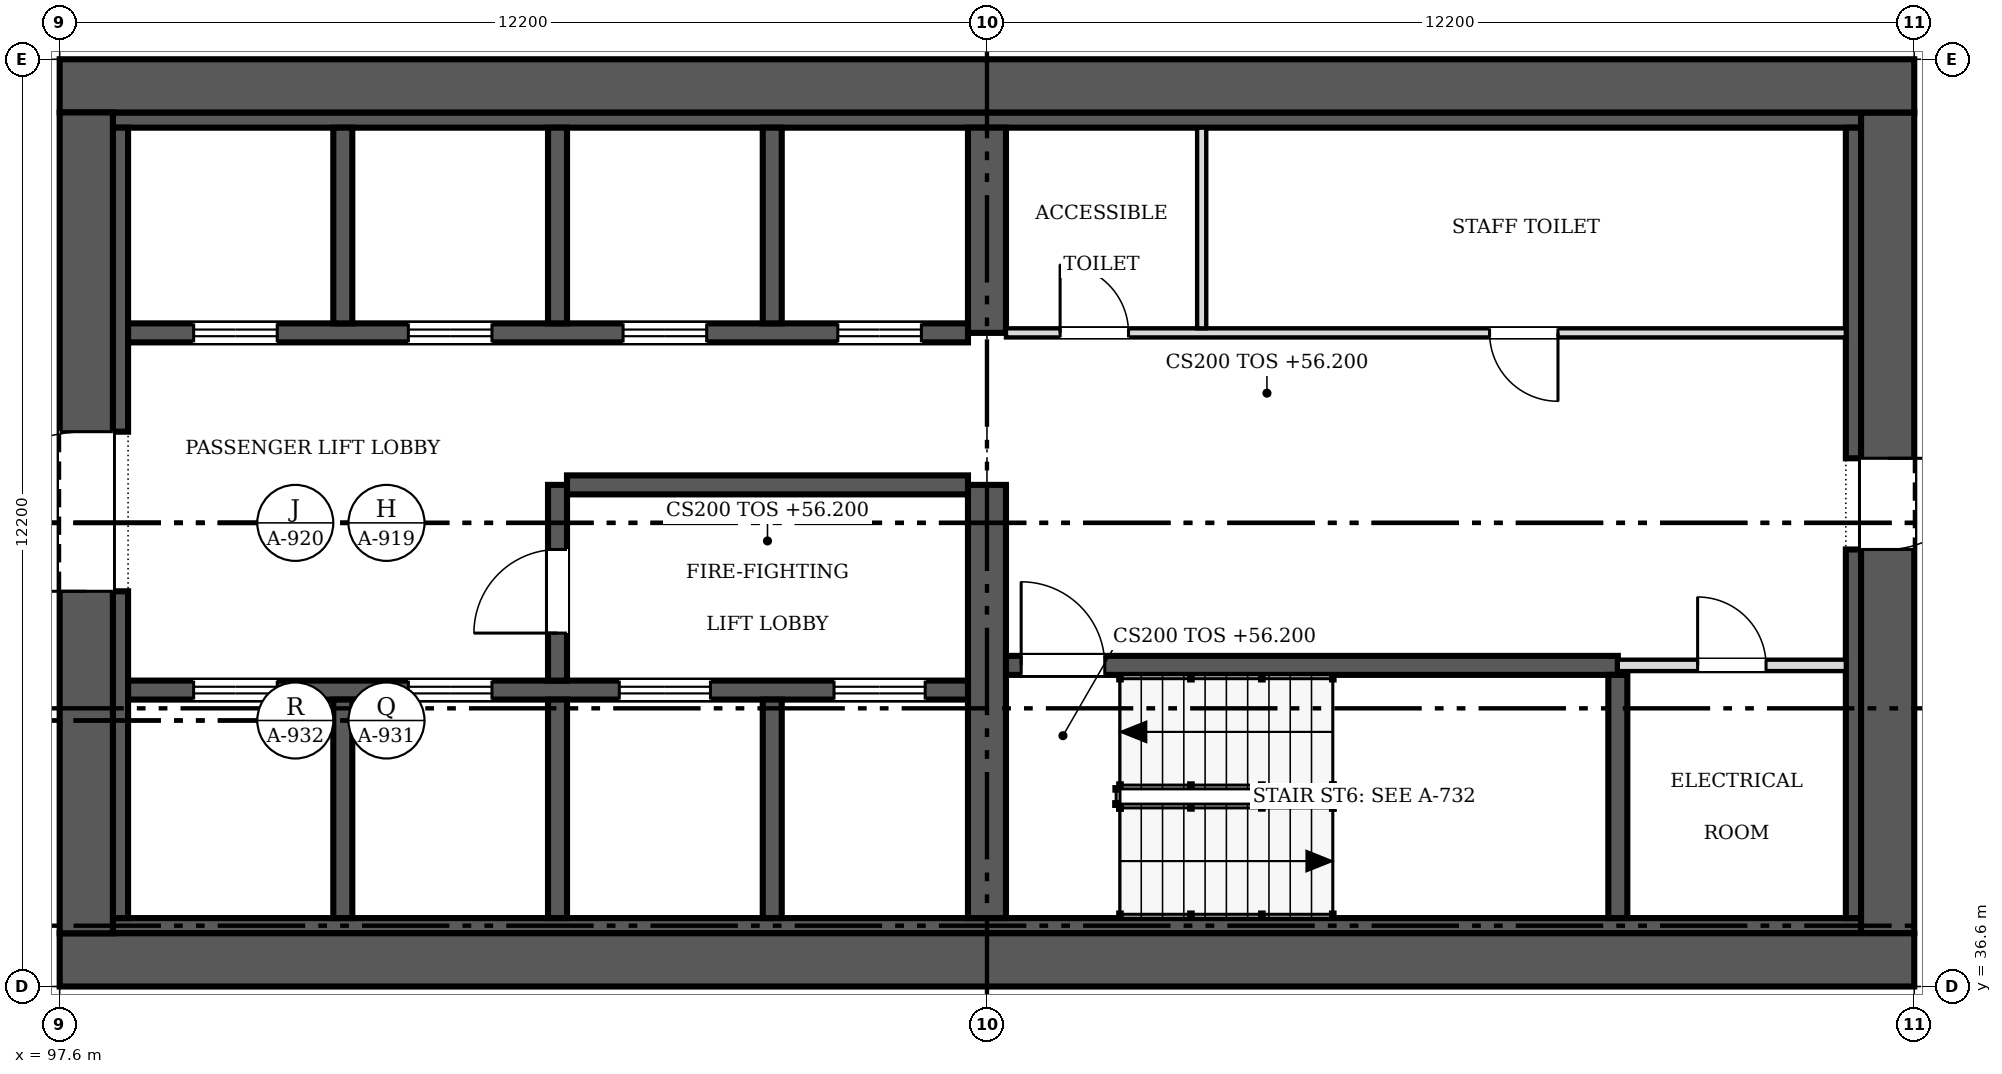
"""IFC4 building model, lengths in metres.
Left out: names, types, materials, properties, quantities, classifications, styles, units other than length and angle.
Written with IfcOpenShell. Run it as: python <this file> out.ifc"""

import sys

from ifc_helpers import new_model, si_unit, direction, frame, frame_2d, origin, place, context, subcontext, project, spatial, rectangle, extrude, source, transform, mapped, element, fill, save


model = new_model("IFC4")
c1 = context("Model", 3, precision=1e-05, world=origin(), true_north=direction((0.0, 1.0)))
c2 = subcontext(c1, "Body", "Model", "MODEL_VIEW")
j1 = project(units=[si_unit("LENGTHUNIT", "METRE"), si_unit("PLANEANGLEUNIT", "RADIAN")], contexts=[c1])
p1 = place(None, origin())
s1 = spatial("IfcSite", under=j1, at=p1, CompositionType="ELEMENT")
p2 = place(p1, origin())
s2 = spatial("IfcBuilding", under=s1, at=p2, CompositionType="ELEMENT")
p3 = place(p2, frame((0.0, 0.0, 56.2)))
s3 = spatial("IfcBuildingStorey", under=s2, at=p3, CompositionType="ELEMENT", Elevation=56.2)
p4 = place(p3, frame((122.0, 36.95, 0.0), z_axis=(0.0, 0.0, 1.0), x_axis=(-1.0, 0.0, 0.0)))
e1 = element("IfcWall", 1, at=p4, inside=s3, PredefinedType="SHEAR", context=c2, shape_type="SweptSolid", body=[
    extrude(rectangle(XDim=24.4, YDim=0.7, at=frame_2d((12.2, 0.0))), origin(), (0.0, 0.0, 1.0), 3.8),
])
p5 = place(p3, frame((97.95, 37.3, 0.0), z_axis=(0.0, 0.0, 1.0), x_axis=(0.0, 1.0, 0.0)))
e2 = element("IfcWall", 2, at=p5, inside=s3, PredefinedType="SHEAR", context=c2, shape_type="SweptSolid", body=[
    extrude(rectangle(XDim=10.8, YDim=0.7, at=frame_2d((5.4, 0.0))), origin(), (0.0, 0.0, 1.0), 3.8),
])
m1 = source(origin(), c2, "Body", "SweptSolid", [
    extrude(rectangle(XDim=2.1, YDim=2.4, at=frame_2d((1.05, 1.2))), frame((0.0, 0.36, 0.0), z_axis=(0.0, -1.0, 0.0), x_axis=(1.0, 0.0, 0.0)), (0.0, 0.0, 1.0), 0.72),
])
p6 = place(p5, frame((4.5, 0.0, 0.0)))
e3 = element("IfcOpeningElement", 3, at=p6, cuts=e2, PredefinedType="OPENING", context=c2, shape_type="MappedRepresentation", body=[
    mapped(m1, transform((0.0, 0.0, 0.0), scale=1.0)),
])
p7 = place(p3, frame((97.6, 48.45, 0.0), z_axis=(0.0, 0.0, 1.0), x_axis=(1.0, 0.0, 0.0)))
e4 = element("IfcWall", 4, at=p7, inside=s3, PredefinedType="SHEAR", context=c2, shape_type="SweptSolid", body=[
    extrude(rectangle(XDim=24.4, YDim=0.7, at=frame_2d((12.2, 0.0))), origin(), (0.0, 0.0, 1.0), 3.8),
])
p8 = place(p3, frame((121.65, 48.1, 0.0), z_axis=(0.0, 0.0, 1.0), x_axis=(0.0, -1.0, 0.0)))
e5 = element("IfcWall", 5, at=p8, inside=s3, PredefinedType="SHEAR", context=c2, shape_type="SweptSolid", body=[
    extrude(rectangle(XDim=10.8, YDim=0.7, at=frame_2d((5.4, 0.0))), origin(), (0.0, 0.0, 1.0), 3.8),
])
m2 = source(origin(), c2, "Body", "SweptSolid", [
    extrude(rectangle(XDim=1.2, YDim=2.1, at=frame_2d((0.6, 1.05))), frame((0.0, 0.36, 0.0), z_axis=(0.0, -1.0, 0.0), x_axis=(1.0, 0.0, 0.0)), (0.0, 0.0, 1.0), 0.72),
])
p9 = place(p8, frame((4.55, 0.0, 0.0)))
e6 = element("IfcOpeningElement", 6, at=p9, cuts=e5, PredefinedType="OPENING", context=c2, shape_type="MappedRepresentation", body=[
    mapped(m2, transform((0.0, 0.0, 0.0), scale=1.0)),
])
for number, where, z_axis, x_axis in (
    (7, (98.3, 37.4, 0.0), (0.0, 0.0, 1.0), (1.0, 0.0, 0.0)),
    (8, (98.3, 48.0, 0.0), (0.0, 0.0, 1.0), (1.0, 0.0, 0.0)),
):
    element("IfcWall", number, at=place(p3, frame(where, z_axis=z_axis, x_axis=x_axis)), inside=s3, PredefinedType="SOLIDWALL", context=c2, shape_type="SweptSolid", body=[
        extrude(rectangle(XDim=23.0, YDim=0.2, at=frame_2d((11.5, 0.0))), origin(), (0.0, 0.0, 1.0), 3.8),
    ])
p10 = place(p3, frame((98.4, 37.5, 0.0), z_axis=(0.0, 0.0, 1.0), x_axis=(0.0, 1.0, 0.0)))
e9 = element("IfcWall", 9, at=p10, inside=s3, PredefinedType="SOLIDWALL", context=c2, shape_type="SweptSolid", body=[
    extrude(rectangle(XDim=4.3, YDim=0.2, at=frame_2d((2.15, 0.0))), origin(), (0.0, 0.0, 1.0), 3.8),
])
p11 = place(p3, frame((98.4, 43.9, 0.0), z_axis=(0.0, 0.0, 1.0), x_axis=(0.0, 1.0, 0.0)))
e10 = element("IfcWall", 10, at=p11, inside=s3, PredefinedType="SOLIDWALL", context=c2, shape_type="SweptSolid", body=[
    extrude(rectangle(XDim=4.0, YDim=0.2, at=frame_2d((2.0, 0.0))), origin(), (0.0, 0.0, 1.0), 3.8),
])
p12 = place(p3, frame((121.2, 37.5, 0.0), z_axis=(0.0, 0.0, 1.0), x_axis=(0.0, 1.0, 0.0)))
e11 = element("IfcWall", 11, at=p12, inside=s3, PredefinedType="SOLIDWALL", context=c2, shape_type="SweptSolid", body=[
    extrude(rectangle(XDim=4.85, YDim=0.2, at=frame_2d((2.425, 0.0))), origin(), (0.0, 0.0, 1.0), 3.8),
])
p13 = place(p3, frame((121.2, 43.55, 0.0), z_axis=(0.0, 0.0, 1.0), x_axis=(0.0, 1.0, 0.0)))
e12 = element("IfcWall", 12, at=p13, inside=s3, PredefinedType="SOLIDWALL", context=c2, shape_type="SweptSolid", body=[
    extrude(rectangle(XDim=4.35, YDim=0.2, at=frame_2d((2.175, 0.0))), origin(), (0.0, 0.0, 1.0), 3.8),
])
p14 = place(p3, frame((109.8, 37.5, 0.0), z_axis=(0.0, 0.0, 1.0), x_axis=(0.0, 1.0, 0.0)))
e13 = element("IfcWall", 13, at=p14, inside=s3, PredefinedType="SHEAR", context=c2, shape_type="SweptSolid", body=[
    extrude(rectangle(XDim=5.7, YDim=0.5, at=frame_2d((2.85, 0.0))), origin(), (0.0, 0.0, 1.0), 3.8),
])
p15 = place(p3, frame((109.8, 45.2, 0.0), z_axis=(0.0, 0.0, 1.0), x_axis=(0.0, 1.0, 0.0)))
e14 = element("IfcWall", 14, at=p15, inside=s3, PredefinedType="SHEAR", context=c2, shape_type="SweptSolid", body=[
    extrude(rectangle(XDim=2.7, YDim=0.5, at=frame_2d((1.35, 0.0))), origin(), (0.0, 0.0, 1.0), 3.8),
])
p16 = place(p3, frame((98.5, 40.5, 0.0), z_axis=(0.0, 0.0, 1.0), x_axis=(1.0, 0.0, 0.0)))
e15 = element("IfcWall", 15, at=p16, inside=s3, PredefinedType="SOLIDWALL", context=c2, shape_type="SweptSolid", body=[
    extrude(rectangle(XDim=11.05, YDim=0.25, at=frame_2d((5.525, 0.0))), origin(), (0.0, 0.0, 1.0), 3.8),
])
m3 = source(origin(), c2, "Body", "SweptSolid", [
    extrude(rectangle(XDim=1.1, YDim=2.1, at=frame_2d((0.55, 1.05))), frame((0.0, 0.135, 0.0), z_axis=(0.0, -1.0, 0.0), x_axis=(1.0, 0.0, 0.0)), (0.0, 0.0, 1.0), 0.27),
])
p17 = place(p16, frame((0.863, 0.0, 0.0)))
e16 = element("IfcOpeningElement", 16, at=p17, cuts=e15, PredefinedType="OPENING", context=c2, shape_type="MappedRepresentation", body=[
    mapped(m3, transform((0.0, 0.0, 0.0), scale=1.0)),
])
p18 = place(p16, frame((3.688, 0.0, 0.0)))
e17 = element("IfcOpeningElement", 17, at=p18, cuts=e15, PredefinedType="OPENING", context=c2, shape_type="MappedRepresentation", body=[
    mapped(m3, transform((0.0, 0.0, 0.0), scale=1.0)),
])
m4 = source(origin(), c2, "Body", "SweptSolid", [
    extrude(rectangle(XDim=1.2, YDim=2.1, at=frame_2d((0.6, 1.05))), frame((0.0, 0.135, 0.0), z_axis=(0.0, -1.0, 0.0), x_axis=(1.0, 0.0, 0.0)), (0.0, 0.0, 1.0), 0.27),
])
p19 = place(p16, frame((6.462, 0.0, 0.0)))
e18 = element("IfcOpeningElement", 18, at=p19, cuts=e15, PredefinedType="OPENING", context=c2, shape_type="MappedRepresentation", body=[
    mapped(m4, transform((0.0, 0.0, 0.0), scale=1.0)),
])
p20 = place(p16, frame((9.288, 0.0, 0.0)))
e19 = element("IfcOpeningElement", 19, at=p20, cuts=e15, PredefinedType="OPENING", context=c2, shape_type="MappedRepresentation", body=[
    mapped(m4, transform((0.0, 0.0, 0.0), scale=1.0)),
])
p21 = place(p3, frame((109.55, 45.2, 0.0), z_axis=(0.0, 0.0, 1.0), x_axis=(-1.0, 0.0, 0.0)))
e20 = element("IfcWall", 20, at=p21, inside=s3, PredefinedType="SOLIDWALL", context=c2, shape_type="SweptSolid", body=[
    extrude(rectangle(XDim=11.05, YDim=0.25, at=frame_2d((5.525, 0.0))), origin(), (0.0, 0.0, 1.0), 3.8),
])
p22 = place(p21, frame((9.087, 0.0, 0.0)))
e21 = element("IfcOpeningElement", 21, at=p22, cuts=e20, PredefinedType="OPENING", context=c2, shape_type="MappedRepresentation", body=[
    mapped(m3, transform((0.0, 0.0, 0.0), scale=1.0)),
])
p23 = place(p21, frame((6.262, 0.0, 0.0)))
e22 = element("IfcOpeningElement", 22, at=p23, cuts=e20, PredefinedType="OPENING", context=c2, shape_type="MappedRepresentation", body=[
    mapped(m3, transform((0.0, 0.0, 0.0), scale=1.0)),
])
p24 = place(p21, frame((3.438, 0.0, 0.0)))
e23 = element("IfcOpeningElement", 23, at=p24, cuts=e20, PredefinedType="OPENING", context=c2, shape_type="MappedRepresentation", body=[
    mapped(m3, transform((0.0, 0.0, 0.0), scale=1.0)),
])
p25 = place(p21, frame((0.613, 0.0, 0.0)))
e24 = element("IfcOpeningElement", 24, at=p25, cuts=e20, PredefinedType="OPENING", context=c2, shape_type="MappedRepresentation", body=[
    mapped(m3, transform((0.0, 0.0, 0.0), scale=1.0)),
])
p26 = place(p3, frame((118.1, 40.825, 0.0), z_axis=(0.0, 0.0, 1.0), x_axis=(-1.0, 0.0, 0.0)))
e25 = element("IfcWall", 25, at=p26, inside=s3, PredefinedType="SOLIDWALL", context=c2, shape_type="SweptSolid", body=[
    extrude(rectangle(XDim=8.05, YDim=0.25, at=frame_2d((4.025, 0.0))), origin(), (0.0, 0.0, 1.0), 3.8),
])
p27 = place(p26, frame((6.75, 0.0, 0.0)))
e26 = element("IfcOpeningElement", 26, at=p27, cuts=e25, PredefinedType="OPENING", context=c2, shape_type="MappedRepresentation", body=[
    mapped(m3, transform((0.0, 0.0, 0.0), scale=1.0)),
])
p28 = place(p3, frame((104.15, 37.5, 0.0), z_axis=(0.0, 0.0, 1.0), x_axis=(0.0, 1.0, 0.0)))
e27 = element("IfcWall", 27, at=p28, inside=s3, PredefinedType="SOLIDWALL", context=c2, shape_type="SweptSolid", body=[
    extrude(rectangle(XDim=2.875, YDim=0.25, at=frame_2d((1.438, 0.0))), origin(), (0.0, 0.0, 1.0), 3.8),
])
p29 = place(p3, frame((104.15, 43.2, 0.0), z_axis=(0.0, 0.0, 1.0), x_axis=(0.0, -1.0, 0.0)))
e28 = element("IfcWall", 28, at=p29, inside=s3, PredefinedType="SOLIDWALL", context=c2, shape_type="SweptSolid", body=[
    extrude(rectangle(XDim=2.575, YDim=0.25, at=frame_2d((1.288, 0.0))), origin(), (0.0, 0.0, 1.0), 3.8),
])
p30 = place(p29, frame((0.85, 0.0, 0.0)))
e29 = element("IfcOpeningElement", 29, at=p30, cuts=e28, PredefinedType="OPENING", context=c2, shape_type="MappedRepresentation", body=[
    mapped(m3, transform((0.0, 0.0, 0.0), scale=1.0)),
])
p31 = place(p3, frame((104.275, 43.2, 0.0), z_axis=(0.0, 0.0, 1.0), x_axis=(1.0, 0.0, 0.0)))
e30 = element("IfcWall", 30, at=p31, inside=s3, PredefinedType="SOLIDWALL", context=c2, shape_type="SweptSolid", body=[
    extrude(rectangle(XDim=5.275, YDim=0.25, at=frame_2d((2.638, 0.0))), origin(), (0.0, 0.0, 1.0), 3.8),
])
p32 = place(p3, frame((118.1, 37.5, 0.0), z_axis=(0.0, 0.0, 1.0), x_axis=(0.0, 1.0, 0.0)))
e31 = element("IfcWall", 31, at=p32, inside=s3, PredefinedType="SOLIDWALL", context=c2, shape_type="SweptSolid", body=[
    extrude(rectangle(XDim=3.2, YDim=0.25, at=frame_2d((1.6, 0.0))), origin(), (0.0, 0.0, 1.0), 3.8),
])
for number, where, z_axis, x_axis in (
    (32, (101.325, 37.5, 0.0), (0.0, 0.0, 1.0), (0.0, 1.0, 0.0)),
    (33, (106.975, 37.5, 0.0), (0.0, 0.0, 1.0), (0.0, 1.0, 0.0)),
):
    element("IfcWall", number, at=place(p3, frame(where, z_axis=z_axis, x_axis=x_axis)), inside=s3, PredefinedType="SOLIDWALL", context=c2, shape_type="SweptSolid", body=[
        extrude(rectangle(XDim=2.875, YDim=0.25, at=frame_2d((1.438, 0.0))), origin(), (0.0, 0.0, 1.0), 3.8),
    ])
for number, where, z_axis, x_axis in (
    (34, (101.325, 45.325, 0.0), (0.0, 0.0, 1.0), (0.0, 1.0, 0.0)),
    (35, (104.15, 45.325, 0.0), (0.0, 0.0, 1.0), (0.0, 1.0, 0.0)),
    (36, (106.975, 45.325, 0.0), (0.0, 0.0, 1.0), (0.0, 1.0, 0.0)),
):
    element("IfcWall", number, at=place(p3, frame(where, z_axis=z_axis, x_axis=x_axis)), inside=s3, PredefinedType="SOLIDWALL", context=c2, shape_type="SweptSolid", body=[
        extrude(rectangle(XDim=2.575, YDim=0.25, at=frame_2d((1.288, 0.0))), origin(), (0.0, 0.0, 1.0), 3.8),
    ])
p33 = place(p3, frame((110.05, 45.2, 0.0), z_axis=(0.0, 0.0, 1.0), x_axis=(1.0, 0.0, 0.0)))
e37 = element("IfcWall", 37, at=p33, inside=s3, PredefinedType="PARTITIONING", context=c2, shape_type="SweptSolid", body=[
    extrude(rectangle(XDim=11.05, YDim=0.12, at=frame_2d((5.525, 0.0))), origin(), (0.0, 0.0, 1.0), 3.6),
])
m5 = source(origin(), c2, "Body", "SweptSolid", [
    extrude(rectangle(XDim=0.9, YDim=2.1, at=frame_2d((0.45, 1.05))), frame((0.0, 0.07, 0.0), z_axis=(0.0, -1.0, 0.0), x_axis=(1.0, 0.0, 0.0)), (0.0, 0.0, 1.0), 0.14),
])
p34 = place(p33, frame((0.712, 0.0, 0.0)))
e38 = element("IfcOpeningElement", 38, at=p34, cuts=e37, PredefinedType="OPENING", context=c2, shape_type="MappedRepresentation", body=[
    mapped(m5, transform((0.0, 0.0, 0.0), scale=1.0)),
])
p35 = place(p33, frame((6.363, 0.0, 0.0)))
e39 = element("IfcOpeningElement", 39, at=p35, cuts=e37, PredefinedType="OPENING", context=c2, shape_type="MappedRepresentation", body=[
    mapped(m5, transform((0.0, 0.0, 0.0), scale=1.0)),
])
p36 = place(p3, frame((121.1, 40.825, 0.0), z_axis=(0.0, 0.0, 1.0), x_axis=(-1.0, 0.0, 0.0)))
e40 = element("IfcWall", 40, at=p36, inside=s3, PredefinedType="PARTITIONING", context=c2, shape_type="SweptSolid", body=[
    extrude(rectangle(XDim=3.0, YDim=0.15, at=frame_2d((1.5, 0.0))), origin(), (0.0, 0.0, 1.0), 3.6),
])
m6 = source(origin(), c2, "Body", "SweptSolid", [
    extrude(rectangle(XDim=0.9, YDim=2.1, at=frame_2d((0.45, 1.05))), frame((0.0, 0.085, 0.0), z_axis=(0.0, -1.0, 0.0), x_axis=(1.0, 0.0, 0.0)), (0.0, 0.0, 1.0), 0.17),
])
p37 = place(p36, frame((1.05, 0.0, 0.0)))
e41 = element("IfcOpeningElement", 41, at=p37, cuts=e40, PredefinedType="OPENING", context=c2, shape_type="MappedRepresentation", body=[
    mapped(m6, transform((0.0, 0.0, 0.0), scale=1.0)),
])
p38 = place(p3, frame((112.625, 45.26, 0.0), z_axis=(0.0, 0.0, 1.0), x_axis=(0.0, 1.0, 0.0)))
e42 = element("IfcWall", 42, at=p38, inside=s3, PredefinedType="PARTITIONING", context=c2, shape_type="SweptSolid", body=[
    extrude(rectangle(XDim=2.64, YDim=0.12, at=frame_2d((1.32, 0.0))), origin(), (0.0, 0.0, 1.0), 3.6),
])
m7 = source(origin(), c2, "Body", "SweptSolid", [
    extrude(rectangle(XDim=2.1, YDim=2.4, at=frame_2d((1.05, 1.2))), frame((0.0, 0.025, 0.0), z_axis=(0.0, -1.0, 0.0), x_axis=(1.0, 0.0, 0.0)), (0.0, 0.0, 1.0), 0.05),
])
p39 = place(p6, origin())
e43 = element("IfcDoor", 43, at=p39, inside=s3, OperationType="DOUBLE_DOOR_SINGLE_SWING", PredefinedType="DOOR", context=c2, shape_type="MappedRepresentation", body=[
    mapped(m7, transform((0.0, 0.0, 0.0), scale=1.0)),
])
fill(e3, e43)
m8 = source(origin(), c2, "Body", "SweptSolid", [
    extrude(rectangle(XDim=1.2, YDim=2.1, at=frame_2d((0.6, 1.05))), frame((0.0, 0.025, 0.0), z_axis=(0.0, -1.0, 0.0), x_axis=(1.0, 0.0, 0.0)), (0.0, 0.0, 1.0), 0.05),
])
p40 = place(p9, origin())
e44 = element("IfcDoor", 44, at=p40, inside=s3, OperationType="SINGLE_SWING_LEFT", PredefinedType="DOOR", context=c2, shape_type="MappedRepresentation", body=[
    mapped(m8, transform((0.0, 0.0, 0.0), scale=1.0)),
])
fill(e6, e44)
m9 = source(origin(), c2, "Body", "SweptSolid", [
    extrude(rectangle(XDim=1.1, YDim=2.1, at=frame_2d((0.55, 1.05))), frame((0.0, 0.025, 0.0), z_axis=(0.0, -1.0, 0.0), x_axis=(1.0, 0.0, 0.0)), (0.0, 0.0, 1.0), 0.05),
])
p41 = place(p17, origin())
e45 = element("IfcDoor", 45, at=p41, inside=s3, OperationType="DOUBLE_DOOR_SLIDING", PredefinedType="DOOR", context=c2, shape_type="MappedRepresentation", body=[
    mapped(m9, transform((0.0, 0.0, 0.0), scale=1.0)),
])
fill(e16, e45)
p42 = place(p18, origin())
e46 = element("IfcDoor", 46, at=p42, inside=s3, OperationType="DOUBLE_DOOR_SLIDING", PredefinedType="DOOR", context=c2, shape_type="MappedRepresentation", body=[
    mapped(m9, transform((0.0, 0.0, 0.0), scale=1.0)),
])
fill(e17, e46)
p43 = place(p19, origin())
e47 = element("IfcDoor", 47, at=p43, inside=s3, OperationType="DOUBLE_DOOR_SLIDING", PredefinedType="DOOR", context=c2, shape_type="MappedRepresentation", body=[
    mapped(m8, transform((0.0, 0.0, 0.0), scale=1.0)),
])
fill(e18, e47)
p44 = place(p20, origin())
e48 = element("IfcDoor", 48, at=p44, inside=s3, OperationType="DOUBLE_DOOR_SLIDING", PredefinedType="DOOR", context=c2, shape_type="MappedRepresentation", body=[
    mapped(m8, transform((0.0, 0.0, 0.0), scale=1.0)),
])
fill(e19, e48)
p45 = place(p22, origin())
e49 = element("IfcDoor", 49, at=p45, inside=s3, OperationType="DOUBLE_DOOR_SLIDING", PredefinedType="DOOR", context=c2, shape_type="MappedRepresentation", body=[
    mapped(m9, transform((0.0, 0.0, 0.0), scale=1.0)),
])
fill(e21, e49)
p46 = place(p23, origin())
e50 = element("IfcDoor", 50, at=p46, inside=s3, OperationType="DOUBLE_DOOR_SLIDING", PredefinedType="DOOR", context=c2, shape_type="MappedRepresentation", body=[
    mapped(m9, transform((0.0, 0.0, 0.0), scale=1.0)),
])
fill(e22, e50)
p47 = place(p24, origin())
e51 = element("IfcDoor", 51, at=p47, inside=s3, OperationType="DOUBLE_DOOR_SLIDING", PredefinedType="DOOR", context=c2, shape_type="MappedRepresentation", body=[
    mapped(m9, transform((0.0, 0.0, 0.0), scale=1.0)),
])
fill(e23, e51)
p48 = place(p25, origin())
e52 = element("IfcDoor", 52, at=p48, inside=s3, OperationType="DOUBLE_DOOR_SLIDING", PredefinedType="DOOR", context=c2, shape_type="MappedRepresentation", body=[
    mapped(m9, transform((0.0, 0.0, 0.0), scale=1.0)),
])
fill(e24, e52)
p49 = place(p27, origin())
e53 = element("IfcDoor", 53, at=p49, inside=s3, OperationType="SINGLE_SWING_RIGHT", PredefinedType="DOOR", context=c2, shape_type="MappedRepresentation", body=[
    mapped(m9, transform((0.0, 0.0, 0.0), scale=1.0)),
])
fill(e26, e53)
p50 = place(p30, origin())
e54 = element("IfcDoor", 54, at=p50, inside=s3, OperationType="SINGLE_SWING_RIGHT", PredefinedType="DOOR", context=c2, shape_type="MappedRepresentation", body=[
    mapped(m9, transform((0.0, 0.0, 0.0), scale=1.0)),
])
fill(e29, e54)
m10 = source(origin(), c2, "Body", "SweptSolid", [
    extrude(rectangle(XDim=0.9, YDim=2.1, at=frame_2d((0.45, 1.05))), frame((0.0, 0.025, 0.0), z_axis=(0.0, -1.0, 0.0), x_axis=(1.0, 0.0, 0.0)), (0.0, 0.0, 1.0), 0.05),
])
p51 = place(p34, origin())
e55 = element("IfcDoor", 55, at=p51, inside=s3, OperationType="SINGLE_SWING_LEFT", PredefinedType="DOOR", context=c2, shape_type="MappedRepresentation", body=[
    mapped(m10, transform((0.0, 0.0, 0.0), scale=1.0)),
])
fill(e38, e55)
p52 = place(p35, origin())
e56 = element("IfcDoor", 56, at=p52, inside=s3, OperationType="SINGLE_SWING_RIGHT", PredefinedType="DOOR", context=c2, shape_type="MappedRepresentation", body=[
    mapped(m10, transform((0.0, 0.0, 0.0), scale=1.0)),
])
fill(e39, e56)
p53 = place(p37, origin())
e57 = element("IfcDoor", 57, at=p53, inside=s3, OperationType="SINGLE_SWING_RIGHT", PredefinedType="DOOR", context=c2, shape_type="MappedRepresentation", body=[
    mapped(m10, transform((0.0, 0.0, 0.0), scale=1.0)),
])
fill(e41, e57)
save(model, sys.argv[1])
